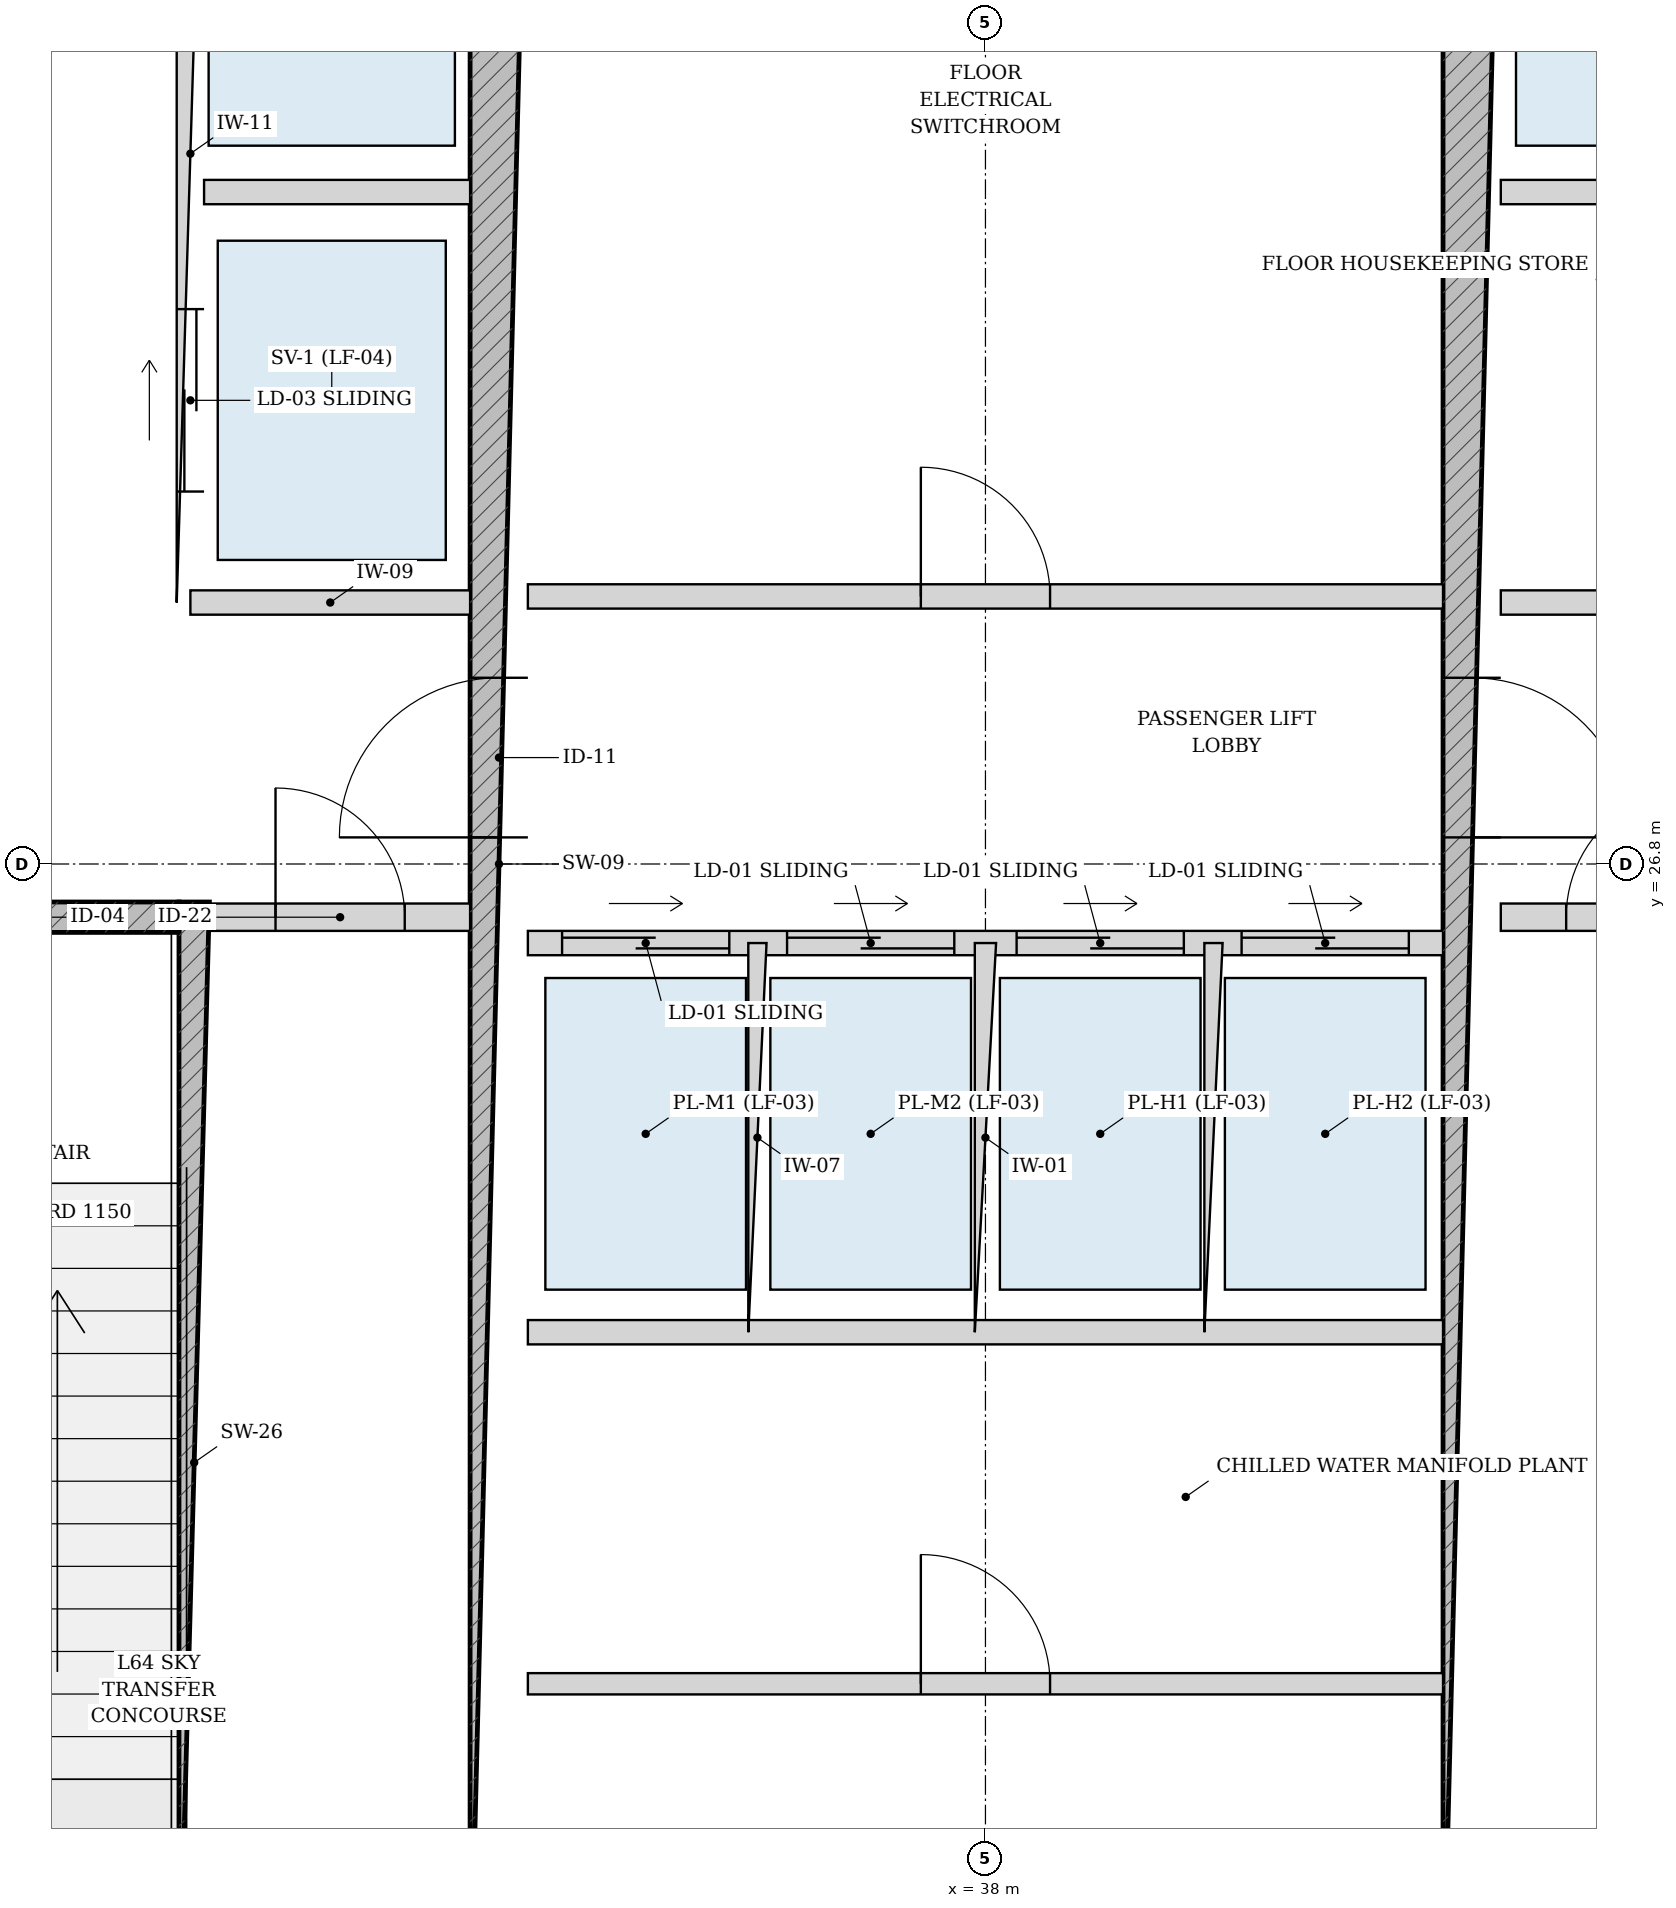
"""IFC4 building model, lengths in metres.
Left out: names, types, materials, properties, quantities, classifications, styles, units other than length and angle.
Written with IfcOpenShell. Run it as: python <this file> out.ifc"""

import sys

from ifc_helpers import new_model, si_unit, direction, frame, frame_2d, origin, place, context, subcontext, project, spatial, rectangle, extrude, source, transform, mapped, element, fill, save


model = new_model("IFC4")
c1 = context("Model", 3, precision=1e-05, world=origin(), true_north=direction((-0.2419218956, 0.970295726276)))
c2 = subcontext(c1, "Body", "Model", "MODEL_VIEW")
j1 = project(units=[si_unit("LENGTHUNIT", "METRE"), si_unit("PLANEANGLEUNIT", "RADIAN")], contexts=[c1])
p1 = place(None, origin())
s1 = spatial("IfcSite", under=j1, at=p1, CompositionType="ELEMENT")
p2 = place(p1, origin())
s2 = spatial("IfcBuilding", under=s1, at=p2, CompositionType="ELEMENT")
p3 = place(p2, frame((0.0, 0.0, 243.0)))
s3 = spatial("IfcBuildingStorey", under=s2, at=p3, CompositionType="ELEMENT", Elevation=243.0)
p4 = place(p3, frame((32.795, 19.175, 0.0), z_axis=(0.0, 0.0, 1.0), x_axis=(0.0, 1.0, 0.0)))
e1 = element("IfcWall", 1, at=p4, inside=s3, PredefinedType="SOLIDWALL", context=c2, shape_type="SweptSolid", body=[
    extrude(rectangle(XDim=7.375, YDim=0.2, at=frame_2d((3.688, 0.0))), origin(), (0.0, 0.0, 1.0), 4.94),
])
p5 = place(p3, frame((29.375, 26.45, 0.0), z_axis=(0.0, 0.0, 1.0), x_axis=(1.0, 0.0, 0.0)))
e2 = element("IfcWall", 2, at=p5, inside=s3, PredefinedType="SOLIDWALL", context=c2, shape_type="SweptSolid", body=[
    extrude(rectangle(XDim=3.32, YDim=0.2, at=frame_2d((1.66, 0.0))), origin(), (0.0, 0.0, 1.0), 4.94),
])
p6 = place(p5, frame((1.185, 0.0, 0.0)))
e3 = element("IfcOpeningElement", 3, at=p6, cuts=e2, PredefinedType="OPENING", context=c2, shape_type="SweptSolid", body=[
    extrude(rectangle(XDim=0.95, YDim=2.15, at=frame_2d((0.475, 1.075))), frame((0.0, 0.11, 0.0), z_axis=(0.0, -1.0, 0.0), x_axis=(1.0, 0.0, 0.0)), (0.0, 0.0, 1.0), 0.22),
])
p7 = place(p3, frame((34.8, 19.175, 0.0), z_axis=(0.0, 0.0, 1.0), x_axis=(0.0, 1.0, 0.0)))
e4 = element("IfcWall", 4, at=p7, inside=s3, PredefinedType="SHEAR", context=c2, shape_type="SweptSolid", body=[
    extrude(rectangle(XDim=15.25, YDim=0.38, at=frame_2d((7.625, 0.0))), origin(), (0.0, 0.0, 1.0), 4.94),
])
p8 = place(p7, frame((7.8, 0.0, 0.0)))
e5 = element("IfcOpeningElement", 5, at=p8, cuts=e4, PredefinedType="OPENING", context=c2, shape_type="SweptSolid", body=[
    extrude(rectangle(XDim=1.05, YDim=2.15, at=frame_2d((0.525, 1.075))), frame((0.0, 0.2, 0.0), z_axis=(0.0, -1.0, 0.0), x_axis=(1.0, 0.0, 0.0)), (0.0, 0.0, 1.0), 0.4),
])
p9 = place(p3, frame((41.2, 19.175, 0.0), z_axis=(0.0, 0.0, 1.0), x_axis=(0.0, 1.0, 0.0)))
e6 = element("IfcWall", 6, at=p9, inside=s3, PredefinedType="SHEAR", context=c2, shape_type="SweptSolid", body=[
    extrude(rectangle(XDim=15.25, YDim=0.38, at=frame_2d((7.625, 0.0))), origin(), (0.0, 0.0, 1.0), 4.94),
])
p10 = place(p9, frame((7.8, 0.0, 0.0)))
e7 = element("IfcOpeningElement", 7, at=p10, cuts=e6, PredefinedType="OPENING", context=c2, shape_type="SweptSolid", body=[
    extrude(rectangle(XDim=1.05, YDim=2.15, at=frame_2d((0.525, 1.075))), frame((0.0, 0.2, 0.0), z_axis=(0.0, -1.0, 0.0), x_axis=(1.0, 0.0, 0.0)), (0.0, 0.0, 1.0), 0.4),
])
p11 = place(p3, frame((32.9, 26.45, 0.0), z_axis=(0.0, 0.0, 1.0), x_axis=(1.0, 0.0, 0.0)))
e8 = element("IfcWall", 8, at=p11, inside=s3, PredefinedType="PARTITIONING", context=c2, shape_type="SweptSolid", body=[
    extrude(rectangle(XDim=1.71, YDim=0.18, at=frame_2d((0.855, 0.0))), origin(), (0.0, 0.0, 1.0), 4.94),
])
p12 = place(p11, frame((0.43, 0.0, 0.0)))
e9 = element("IfcOpeningElement", 9, at=p12, cuts=e8, PredefinedType="OPENING", context=c2, shape_type="SweptSolid", body=[
    extrude(rectangle(XDim=0.85, YDim=2.1, at=frame_2d((0.425, 1.05))), frame((0.0, 0.1, 0.0), z_axis=(0.0, -1.0, 0.0), x_axis=(1.0, 0.0, 0.0)), (0.0, 0.0, 1.0), 0.2),
])
p13 = place(p3, frame((41.39, 26.45, 0.0), z_axis=(0.0, 0.0, 1.0), x_axis=(1.0, 0.0, 0.0)))
e10 = element("IfcWall", 10, at=p13, inside=s3, PredefinedType="PARTITIONING", context=c2, shape_type="SweptSolid", body=[
    extrude(rectangle(XDim=1.71, YDim=0.18, at=frame_2d((0.855, 0.0))), origin(), (0.0, 0.0, 1.0), 4.94),
])
p14 = place(p13, frame((0.43, 0.0, 0.0)))
e11 = element("IfcOpeningElement", 11, at=p14, cuts=e10, PredefinedType="OPENING", context=c2, shape_type="SweptSolid", body=[
    extrude(rectangle(XDim=0.85, YDim=2.1, at=frame_2d((0.425, 1.05))), frame((0.0, 0.1, 0.0), z_axis=(0.0, -1.0, 0.0), x_axis=(1.0, 0.0, 0.0)), (0.0, 0.0, 1.0), 0.2),
])
p15 = place(p3, frame((32.77, 28.52, 0.0), z_axis=(0.0, 0.0, 1.0), x_axis=(0.0, 1.0, 0.0)))
e12 = element("IfcWall", 12, at=p15, inside=s3, PredefinedType="PARTITIONING", context=c2, shape_type="SweptSolid", body=[
    extrude(rectangle(XDim=5.905, YDim=0.18, at=frame_2d((2.953, 0.0))), origin(), (0.0, 0.0, 1.0), 4.94),
])
p16 = place(p15, frame((3.655, 0.0, 0.0)))
e13 = element("IfcOpeningElement", 13, at=p16, cuts=e12, PredefinedType="OPENING", context=c2, shape_type="SweptSolid", body=[
    extrude(rectangle(XDim=1.15, YDim=2.2, at=frame_2d((0.575, 1.1))), frame((0.0, 0.1, 0.0), z_axis=(0.0, -1.0, 0.0), x_axis=(1.0, 0.0, 0.0)), (0.0, 0.0, 1.0), 0.2),
])
p17 = place(p15, frame((0.73, 0.0, 0.0)))
e14 = element("IfcOpeningElement", 14, at=p17, cuts=e12, PredefinedType="OPENING", context=c2, shape_type="SweptSolid", body=[
    extrude(rectangle(XDim=1.2, YDim=2.25, at=frame_2d((0.6, 1.125))), frame((0.0, 0.1, 0.0), z_axis=(0.0, -1.0, 0.0), x_axis=(1.0, 0.0, 0.0)), (0.0, 0.0, 1.0), 0.2),
])
p18 = place(p3, frame((32.86, 31.22, 0.0), z_axis=(0.0, 0.0, 1.0), x_axis=(1.0, 0.0, 0.0)))
e15 = element("IfcWall", 15, at=p18, inside=s3, PredefinedType="PARTITIONING", context=c2, shape_type="SweptSolid", body=[
    extrude(rectangle(XDim=1.75, YDim=0.16, at=frame_2d((0.875, 0.0))), origin(), (0.0, 0.0, 1.0), 4.94),
])
p19 = place(p3, frame((32.77, 28.52, 0.0), z_axis=(0.0, 0.0, 1.0), x_axis=(1.0, 0.0, 0.0)))
e16 = element("IfcWall", 16, at=p19, inside=s3, PredefinedType="PARTITIONING", context=c2, shape_type="SweptSolid", body=[
    extrude(rectangle(XDim=1.84, YDim=0.16, at=frame_2d((0.92, 0.0))), origin(), (0.0, 0.0, 1.0), 4.94),
])
p20 = place(p3, frame((41.39, 31.22, 0.0), z_axis=(0.0, 0.0, 1.0), x_axis=(1.0, 0.0, 0.0)))
e17 = element("IfcWall", 17, at=p20, inside=s3, PredefinedType="PARTITIONING", context=c2, shape_type="SweptSolid", body=[
    extrude(rectangle(XDim=1.75, YDim=0.16, at=frame_2d((0.875, 0.0))), origin(), (0.0, 0.0, 1.0), 4.94),
])
p21 = place(p3, frame((41.39, 28.52, 0.0), z_axis=(0.0, 0.0, 1.0), x_axis=(1.0, 0.0, 0.0)))
e18 = element("IfcWall", 18, at=p21, inside=s3, PredefinedType="PARTITIONING", context=c2, shape_type="SweptSolid", body=[
    extrude(rectangle(XDim=1.84, YDim=0.16, at=frame_2d((0.92, 0.0))), origin(), (0.0, 0.0, 1.0), 4.94),
])
p22 = place(p3, frame((34.99, 28.56, 0.0), z_axis=(0.0, 0.0, 1.0), x_axis=(1.0, 0.0, 0.0)))
e19 = element("IfcWall", 19, at=p22, inside=s3, PredefinedType="PARTITIONING", context=c2, shape_type="SweptSolid", body=[
    extrude(rectangle(XDim=6.02, YDim=0.16, at=frame_2d((3.01, 0.0))), origin(), (0.0, 0.0, 1.0), 4.94),
])
p23 = place(p22, frame((2.585, 0.0, 0.0)))
e20 = element("IfcOpeningElement", 20, at=p23, cuts=e19, PredefinedType="OPENING", context=c2, shape_type="SweptSolid", body=[
    extrude(rectangle(XDim=0.85, YDim=2.1, at=frame_2d((0.425, 1.05))), frame((0.0, 0.09, 0.0), z_axis=(0.0, -1.0, 0.0), x_axis=(1.0, 0.0, 0.0)), (0.0, 0.0, 1.0), 0.18),
])
p24 = place(p3, frame((34.99, 26.28, 0.0), z_axis=(0.0, 0.0, 1.0), x_axis=(1.0, 0.0, 0.0)))
e21 = element("IfcWall", 21, at=p24, inside=s3, PredefinedType="PARTITIONING", context=c2, shape_type="SweptSolid", body=[
    extrude(rectangle(XDim=6.02, YDim=0.16, at=frame_2d((3.01, 0.0))), origin(), (0.0, 0.0, 1.0), 4.94),
])
p25 = place(p24, frame((0.225, 0.0, 0.0)))
e22 = element("IfcOpeningElement", 22, at=p25, cuts=e21, PredefinedType="OPENING", context=c2, shape_type="SweptSolid", body=[
    extrude(rectangle(XDim=1.1, YDim=2.2, at=frame_2d((0.55, 1.1))), frame((0.0, 0.09, 0.0), z_axis=(0.0, -1.0, 0.0), x_axis=(1.0, 0.0, 0.0)), (0.0, 0.0, 1.0), 0.18),
])
p26 = place(p24, frame((1.705, 0.0, 0.0)))
e23 = element("IfcOpeningElement", 23, at=p26, cuts=e21, PredefinedType="OPENING", context=c2, shape_type="SweptSolid", body=[
    extrude(rectangle(XDim=1.1, YDim=2.2, at=frame_2d((0.55, 1.1))), frame((0.0, 0.09, 0.0), z_axis=(0.0, -1.0, 0.0), x_axis=(1.0, 0.0, 0.0)), (0.0, 0.0, 1.0), 0.18),
])
p27 = place(p24, frame((3.215, 0.0, 0.0)))
e24 = element("IfcOpeningElement", 24, at=p27, cuts=e21, PredefinedType="OPENING", context=c2, shape_type="SweptSolid", body=[
    extrude(rectangle(XDim=1.1, YDim=2.2, at=frame_2d((0.55, 1.1))), frame((0.0, 0.09, 0.0), z_axis=(0.0, -1.0, 0.0), x_axis=(1.0, 0.0, 0.0)), (0.0, 0.0, 1.0), 0.18),
])
p28 = place(p24, frame((4.695, 0.0, 0.0)))
e25 = element("IfcOpeningElement", 25, at=p28, cuts=e21, PredefinedType="OPENING", context=c2, shape_type="SweptSolid", body=[
    extrude(rectangle(XDim=1.1, YDim=2.2, at=frame_2d((0.55, 1.1))), frame((0.0, 0.09, 0.0), z_axis=(0.0, -1.0, 0.0), x_axis=(1.0, 0.0, 0.0)), (0.0, 0.0, 1.0), 0.18),
])
p29 = place(p3, frame((34.99, 23.72, 0.0), z_axis=(0.0, 0.0, 1.0), x_axis=(1.0, 0.0, 0.0)))
e26 = element("IfcWall", 26, at=p29, inside=s3, PredefinedType="PARTITIONING", context=c2, shape_type="SweptSolid", body=[
    extrude(rectangle(XDim=6.02, YDim=0.16, at=frame_2d((3.01, 0.0))), origin(), (0.0, 0.0, 1.0), 4.94),
])
p30 = place(p3, frame((36.5, 23.72, 0.0), z_axis=(0.0, 0.0, 1.0), x_axis=(0.0, 1.0, 0.0)))
e27 = element("IfcWall", 27, at=p30, inside=s3, PredefinedType="PARTITIONING", context=c2, shape_type="SweptSolid", body=[
    extrude(rectangle(XDim=2.56, YDim=0.12, at=frame_2d((1.28, 0.0))), origin(), (0.0, 0.0, 1.0), 4.94),
])
p31 = place(p3, frame((38.0, 23.72, 0.0), z_axis=(0.0, 0.0, 1.0), x_axis=(0.0, 1.0, 0.0)))
e28 = element("IfcWall", 28, at=p31, inside=s3, PredefinedType="PARTITIONING", context=c2, shape_type="SweptSolid", body=[
    extrude(rectangle(XDim=2.56, YDim=0.14, at=frame_2d((1.28, 0.0))), origin(), (0.0, 0.0, 1.0), 4.94),
])
p32 = place(p3, frame((39.5, 23.72, 0.0), z_axis=(0.0, 0.0, 1.0), x_axis=(0.0, 1.0, 0.0)))
e29 = element("IfcWall", 29, at=p32, inside=s3, PredefinedType="PARTITIONING", context=c2, shape_type="SweptSolid", body=[
    extrude(rectangle(XDim=2.56, YDim=0.12, at=frame_2d((1.28, 0.0))), origin(), (0.0, 0.0, 1.0), 4.94),
])
p33 = place(p3, frame((34.99, 21.407, 0.0), z_axis=(0.0, 0.0, 1.0), x_axis=(1.0, 0.0, 0.0)))
e30 = element("IfcWall", 30, at=p33, inside=s3, PredefinedType="PARTITIONING", context=c2, shape_type="SweptSolid", body=[
    extrude(rectangle(XDim=6.02, YDim=0.14, at=frame_2d((3.01, 0.0))), origin(), (0.0, 0.0, 1.0), 4.94),
])
p34 = place(p33, frame((2.585, 0.0, 0.0)))
e31 = element("IfcOpeningElement", 31, at=p34, cuts=e30, PredefinedType="OPENING", context=c2, shape_type="SweptSolid", body=[
    extrude(rectangle(XDim=0.85, YDim=2.1, at=frame_2d((0.425, 1.05))), frame((0.0, 0.08, 0.0), z_axis=(0.0, -1.0, 0.0), x_axis=(1.0, 0.0, 0.0)), (0.0, 0.0, 1.0), 0.16),
])
m1 = source(origin(), c2, "Body", "SweptSolid", [
    extrude(rectangle(XDim=1.05, YDim=2.15, at=frame_2d((0.525, 1.075))), frame((0.0, 0.025, 0.0), z_axis=(0.0, -1.0, 0.0), x_axis=(1.0, 0.0, 0.0)), (0.0, 0.0, 1.0), 0.05),
])
p35 = place(p8, origin())
e32 = element("IfcDoor", 32, at=p35, inside=s3, OperationType="SINGLE_SWING_LEFT", PredefinedType="DOOR", context=c2, shape_type="MappedRepresentation", body=[
    mapped(m1, transform((0.0, 0.0, 0.0), scale=1.0)),
])
fill(e5, e32)
p36 = place(p10, frame((1.05, 0.0, 0.0), z_axis=(0.0, 0.0, 1.0), x_axis=(-1.0, 0.0, 0.0)))
e33 = element("IfcDoor", 33, at=p36, inside=s3, OperationType="SINGLE_SWING_RIGHT", PredefinedType="DOOR", context=c2, shape_type="MappedRepresentation", body=[
    mapped(m1, transform((0.0, 0.0, 0.0), scale=1.0)),
])
fill(e7, e33)
m2 = source(origin(), c2, "Body", "SweptSolid", [
    extrude(rectangle(XDim=0.85, YDim=2.1, at=frame_2d((0.425, 1.05))), frame((0.0, 0.025, 0.0), z_axis=(0.0, -1.0, 0.0), x_axis=(1.0, 0.0, 0.0)), (0.0, 0.0, 1.0), 0.05),
])
p37 = place(p12, origin())
e34 = element("IfcDoor", 34, at=p37, inside=s3, OperationType="SINGLE_SWING_LEFT", PredefinedType="DOOR", context=c2, shape_type="MappedRepresentation", body=[
    mapped(m2, transform((0.0, 0.0, 0.0), scale=1.0)),
])
fill(e9, e34)
p38 = place(p14, origin())
e35 = element("IfcDoor", 35, at=p38, inside=s3, OperationType="SINGLE_SWING_RIGHT", PredefinedType="DOOR", context=c2, shape_type="MappedRepresentation", body=[
    mapped(m2, transform((0.0, 0.0, 0.0), scale=1.0)),
])
fill(e11, e35)
p39 = place(p23, origin())
e36 = element("IfcDoor", 36, at=p39, inside=s3, OperationType="SINGLE_SWING_LEFT", PredefinedType="DOOR", context=c2, shape_type="MappedRepresentation", body=[
    mapped(m2, transform((0.0, 0.0, 0.0), scale=1.0)),
])
fill(e20, e36)
p40 = place(p34, origin())
e37 = element("IfcDoor", 37, at=p40, inside=s3, OperationType="SINGLE_SWING_LEFT", PredefinedType="DOOR", context=c2, shape_type="MappedRepresentation", body=[
    mapped(m2, transform((0.0, 0.0, 0.0), scale=1.0)),
])
fill(e31, e37)
m3 = source(origin(), c2, "Body", "SweptSolid", [
    extrude(rectangle(XDim=1.2, YDim=2.25, at=frame_2d((0.6, 1.125))), frame((0.0, 0.025, 0.0), z_axis=(0.0, -1.0, 0.0), x_axis=(1.0, 0.0, 0.0)), (0.0, 0.0, 1.0), 0.05),
])
p41 = place(p17, origin())
e38 = element("IfcDoor", 38, at=p41, inside=s3, OperationType="DOUBLE_DOOR_SLIDING", PredefinedType="DOOR", context=c2, shape_type="MappedRepresentation", body=[
    mapped(m3, transform((0.0, 0.0, 0.0), scale=1.0)),
])
fill(e14, e38)
m4 = source(origin(), c2, "Body", "SweptSolid", [
    extrude(rectangle(XDim=1.1, YDim=2.2, at=frame_2d((0.55, 1.1))), frame((0.0, 0.025, 0.0), z_axis=(0.0, -1.0, 0.0), x_axis=(1.0, 0.0, 0.0)), (0.0, 0.0, 1.0), 0.05),
])
p42 = place(p25, origin())
e39 = element("IfcDoor", 39, at=p42, inside=s3, OperationType="DOUBLE_DOOR_SLIDING", PredefinedType="DOOR", context=c2, shape_type="MappedRepresentation", body=[
    mapped(m4, transform((0.0, 0.0, 0.0), scale=1.0)),
])
fill(e22, e39)
p43 = place(p26, origin())
e40 = element("IfcDoor", 40, at=p43, inside=s3, OperationType="DOUBLE_DOOR_SLIDING", PredefinedType="DOOR", context=c2, shape_type="MappedRepresentation", body=[
    mapped(m4, transform((0.0, 0.0, 0.0), scale=1.0)),
])
fill(e23, e40)
p44 = place(p27, origin())
e41 = element("IfcDoor", 41, at=p44, inside=s3, OperationType="DOUBLE_DOOR_SLIDING", PredefinedType="DOOR", context=c2, shape_type="MappedRepresentation", body=[
    mapped(m4, transform((0.0, 0.0, 0.0), scale=1.0)),
])
fill(e24, e41)
p45 = place(p28, origin())
e42 = element("IfcDoor", 42, at=p45, inside=s3, OperationType="DOUBLE_DOOR_SLIDING", PredefinedType="DOOR", context=c2, shape_type="MappedRepresentation", body=[
    mapped(m4, transform((0.0, 0.0, 0.0), scale=1.0)),
])
fill(e25, e42)
save(model, sys.argv[1])
